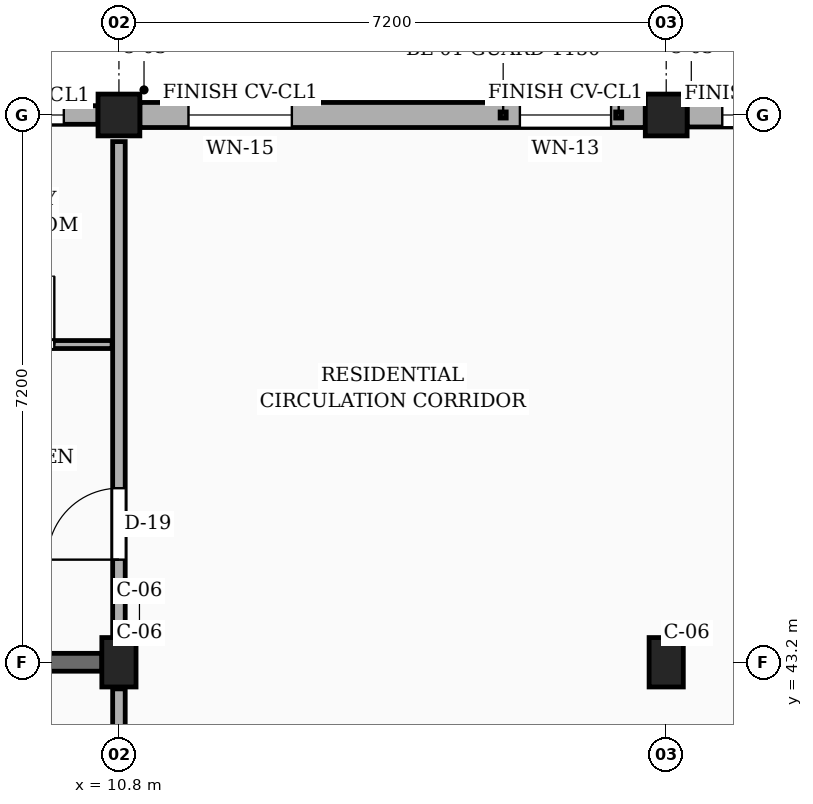
"""IFC4 building model, lengths in metres.
Left out: names, types, materials, properties, quantities, classifications, styles, units other than length and angle.
Written with IfcOpenShell. Run it as: python <this file> out.ifc"""

import sys

from ifc_helpers import new_model, si_unit, direction, frame, frame_2d, origin, origin_2d, place, context, subcontext, project, spatial, rectangle, extrude, element, fill, save


model = new_model("IFC4")
c1 = context("Model", 3, precision=1e-05, world=origin(), true_north=direction((0.0, 1.0)))
c2 = subcontext(c1, "Body", "Model", "MODEL_VIEW")
j1 = project(units=[si_unit("LENGTHUNIT", "METRE"), si_unit("PLANEANGLEUNIT", "RADIAN")], contexts=[c1])
p1 = place(None, origin())
s1 = spatial("IfcSite", under=j1, at=p1, CompositionType="ELEMENT")
p2 = place(p1, origin())
s2 = spatial("IfcBuilding", under=s1, at=p2, CompositionType="ELEMENT")
p3 = place(p2, frame((0.0, 0.0, 20.25)))
s3 = spatial("IfcBuildingStorey", under=s2, at=p3, CompositionType="ELEMENT", Elevation=20.25)
p4 = place(p3, frame((10.8, 43.2, 0.0), z_axis=(0.0, 0.0, 1.0), x_axis=(1.0, 0.0, 0.0)))
e1 = element("IfcColumn", 1, at=p4, inside=s3, PredefinedType="COLUMN", context=c2, shape_type="SweptSolid", body=[
    extrude(rectangle(XDim=0.45, YDim=0.65, at=origin_2d()), origin(), (0.0, 0.0, 1.0), 3.15),
])
p5 = place(p3, frame((10.8, 50.4, 0.0), z_axis=(0.0, 0.0, 1.0), x_axis=(1.0, 0.0, 0.0)))
e2 = element("IfcColumn", 2, at=p5, inside=s3, PredefinedType="COLUMN", context=c2, shape_type="SweptSolid", body=[
    extrude(rectangle(XDim=0.55, YDim=0.55, at=origin_2d()), origin(), (0.0, 0.0, 1.0), 3.15),
])
p6 = place(p3, frame((18.0, 43.2, 0.0), z_axis=(0.0, 0.0, 1.0), x_axis=(1.0, 0.0, 0.0)))
e3 = element("IfcColumn", 3, at=p6, inside=s3, PredefinedType="COLUMN", context=c2, shape_type="SweptSolid", body=[
    extrude(rectangle(XDim=0.45, YDim=0.65, at=origin_2d()), origin(), (0.0, 0.0, 1.0), 3.15),
])
p7 = place(p3, frame((18.0, 50.4, 0.0), z_axis=(0.0, 0.0, 1.0), x_axis=(1.0, 0.0, 0.0)))
e4 = element("IfcColumn", 4, at=p7, inside=s3, PredefinedType="COLUMN", context=c2, shape_type="SweptSolid", body=[
    extrude(rectangle(XDim=0.55, YDim=0.55, at=origin_2d()), origin(), (0.0, 0.0, 1.0), 3.15),
])
p8 = place(p3, frame((3.875, 43.2, 0.0), z_axis=(0.0, 0.0, 1.0), x_axis=(1.0, 0.0, 0.0)))
e5 = element("IfcWall", 5, at=p8, inside=s3, PredefinedType="SOLIDWALL", context=c2, shape_type="SweptSolid", body=[
    extrude(rectangle(XDim=6.7, YDim=0.235, at=frame_2d((3.35, 0.0))), origin(), (0.0, 0.0, 1.0), 2.17),
])
p9 = place(p3, frame((24.925, 50.4, 0.0), z_axis=(0.0, 0.0, 1.0), x_axis=(-1.0, 0.0, 0.0)))
e6 = element("IfcWall", 6, at=p9, inside=s3, PredefinedType="SOLIDWALL", context=c2, shape_type="SweptSolid", body=[
    extrude(rectangle(XDim=6.65, YDim=0.315, at=frame_2d((3.325, 0.0))), origin(), (0.0, 0.0, 1.0), 2.44),
])
p10 = place(p9, frame((2.155, 0.0, 0.78)))
e7 = element("IfcOpeningElement", 7, at=p10, cuts=e6, PredefinedType="OPENING", context=c2, shape_type="SweptSolid", body=[
    extrude(rectangle(XDim=1.04, YDim=1.26, at=frame_2d((0.52, 0.63))), frame((0.0, 0.167, 0.0), z_axis=(0.0, -1.0, 0.0), x_axis=(1.0, 0.0, 0.0)), (0.0, 0.0, 1.0), 0.335),
])
p11 = place(p9, frame((5.147, 0.0, 0.78)))
e8 = element("IfcOpeningElement", 8, at=p11, cuts=e6, PredefinedType="OPENING", context=c2, shape_type="SweptSolid", body=[
    extrude(rectangle(XDim=1.04, YDim=1.26, at=frame_2d((0.52, 0.63))), frame((0.0, 0.167, 0.0), z_axis=(0.0, -1.0, 0.0), x_axis=(1.0, 0.0, 0.0)), (0.0, 0.0, 1.0), 0.335),
])
p12 = place(p3, frame((17.725, 50.4, 0.0), z_axis=(0.0, 0.0, 1.0), x_axis=(-1.0, 0.0, 0.0)))
e9 = element("IfcWall", 9, at=p12, inside=s3, PredefinedType="SOLIDWALL", context=c2, shape_type="SweptSolid", body=[
    extrude(rectangle(XDim=6.65, YDim=0.33, at=frame_2d((3.325, 0.0))), origin(), (0.0, 0.0, 1.0), 2.44),
])
p13 = place(p12, frame((0.45, 0.0, 0.78)))
e10 = element("IfcOpeningElement", 10, at=p13, cuts=e9, PredefinedType="OPENING", context=c2, shape_type="SweptSolid", body=[
    extrude(rectangle(XDim=1.2, YDim=1.26, at=frame_2d((0.6, 0.63))), frame((0.0, 0.175, 0.0), z_axis=(0.0, -1.0, 0.0), x_axis=(1.0, 0.0, 0.0)), (0.0, 0.0, 1.0), 0.35),
])
p14 = place(p12, frame((4.65, 0.0, 0.78)))
e11 = element("IfcOpeningElement", 11, at=p14, cuts=e9, PredefinedType="OPENING", context=c2, shape_type="SweptSolid", body=[
    extrude(rectangle(XDim=1.36, YDim=1.26, at=frame_2d((0.68, 0.63))), frame((0.0, 0.175, 0.0), z_axis=(0.0, -1.0, 0.0), x_axis=(1.0, 0.0, 0.0)), (0.0, 0.0, 1.0), 0.35),
])
p15 = place(p3, frame((10.525, 50.4, 0.0), z_axis=(0.0, 0.0, 1.0), x_axis=(-1.0, 0.0, 0.0)))
e12 = element("IfcWall", 12, at=p15, inside=s3, PredefinedType="SOLIDWALL", context=c2, shape_type="SweptSolid", body=[
    extrude(rectangle(XDim=6.65, YDim=0.245, at=frame_2d((3.325, 0.0))), origin(), (0.0, 0.0, 1.0), 2.44),
])
p16 = place(p15, frame((0.45, 0.0, 0.78)))
e13 = element("IfcOpeningElement", 13, at=p16, cuts=e12, PredefinedType="OPENING", context=c2, shape_type="SweptSolid", body=[
    extrude(rectangle(XDim=1.36, YDim=1.26, at=frame_2d((0.68, 0.63))), frame((0.0, 0.133, 0.0), z_axis=(0.0, -1.0, 0.0), x_axis=(1.0, 0.0, 0.0)), (0.0, 0.0, 1.0), 0.265),
])
p17 = place(p15, frame((4.65, 0.0, 0.78)))
e14 = element("IfcOpeningElement", 14, at=p17, cuts=e12, PredefinedType="OPENING", context=c2, shape_type="SweptSolid", body=[
    extrude(rectangle(XDim=0.9, YDim=1.36, at=frame_2d((0.45, 0.68))), frame((0.0, 0.133, 0.0), z_axis=(0.0, -1.0, 0.0), x_axis=(1.0, 0.0, 0.0)), (0.0, 0.0, 1.0), 0.265),
])
p18 = place(p3, frame((10.8, 36.35, 0.0), z_axis=(0.0, 0.0, 1.0), x_axis=(0.0, 1.0, 0.0)))
e15 = element("IfcWall", 15, at=p18, inside=s3, PredefinedType="PARTITIONING", context=c2, shape_type="SweptSolid", body=[
    extrude(rectangle(XDim=6.5, YDim=0.165, at=frame_2d((3.25, 0.0))), origin(), (0.0, 0.0, 1.0), 2.305),
])
p19 = place(p18, frame((1.0, 0.0, 0.0)))
e16 = element("IfcOpeningElement", 16, at=p19, cuts=e15, PredefinedType="OPENING", context=c2, shape_type="SweptSolid", body=[
    extrude(rectangle(XDim=1.0, YDim=2.15, at=frame_2d((0.5, 1.075))), frame((0.0, 0.093, 0.0), z_axis=(0.0, -1.0, 0.0), x_axis=(1.0, 0.0, 0.0)), (0.0, 0.0, 1.0), 0.185),
])
p20 = place(p3, frame((10.8, 43.55, 0.0), z_axis=(0.0, 0.0, 1.0), x_axis=(0.0, 1.0, 0.0)))
e17 = element("IfcWall", 17, at=p20, inside=s3, PredefinedType="PARTITIONING", context=c2, shape_type="SweptSolid", body=[
    extrude(rectangle(XDim=6.5, YDim=0.165, at=frame_2d((3.25, 0.0))), origin(), (0.0, 0.0, 1.0), 2.305),
])
p21 = place(p20, frame((1.0, 0.0, 0.0)))
e18 = element("IfcOpeningElement", 18, at=p21, cuts=e17, PredefinedType="OPENING", context=c2, shape_type="SweptSolid", body=[
    extrude(rectangle(XDim=0.94, YDim=2.12, at=frame_2d((0.47, 1.06))), frame((0.0, 0.093, 0.0), z_axis=(0.0, -1.0, 0.0), x_axis=(1.0, 0.0, 0.0)), (0.0, 0.0, 1.0), 0.185),
])
p22 = place(p3, frame((8.29, 47.38, 0.0), z_axis=(0.0, 0.0, 1.0), x_axis=(1.0, 0.0, 0.0)))
e19 = element("IfcWall", 19, at=p22, inside=s3, PredefinedType="PARTITIONING", context=c2, shape_type="SweptSolid", body=[
    extrude(rectangle(XDim=2.42, YDim=0.105, at=frame_2d((1.21, 0.0))), origin(), (0.0, 0.0, 1.0), 2.305),
])
p23 = place(p22, frame((0.76, 0.0, 0.0)))
e20 = element("IfcOpeningElement", 20, at=p23, cuts=e19, PredefinedType="OPENING", context=c2, shape_type="SweptSolid", body=[
    extrude(rectangle(XDim=0.9, YDim=2.05, at=frame_2d((0.45, 1.025))), frame((0.0, 0.062, 0.0), z_axis=(0.0, -1.0, 0.0), x_axis=(1.0, 0.0, 0.0)), (0.0, 0.0, 1.0), 0.125),
])
p24 = place(p11, origin())
e21 = element("IfcWindow", 21, at=p24, inside=s3, PartitioningType="SINGLE_PANEL", PredefinedType="WINDOW", context=c2, shape_type="SweptSolid", body=[
    extrude(rectangle(XDim=1.04, YDim=1.26, at=frame_2d((0.52, 0.63))), frame((0.0, 0.03, 0.0), z_axis=(0.0, -1.0, 0.0), x_axis=(1.0, 0.0, 0.0)), (0.0, 0.0, 1.0), 0.06),
])
fill(e8, e21)
p25 = place(p13, origin())
e22 = element("IfcWindow", 22, at=p25, inside=s3, PartitioningType="SINGLE_PANEL", PredefinedType="WINDOW", context=c2, shape_type="SweptSolid", body=[
    extrude(rectangle(XDim=1.2, YDim=1.26, at=frame_2d((0.6, 0.63))), frame((0.0, 0.03, 0.0), z_axis=(0.0, -1.0, 0.0), x_axis=(1.0, 0.0, 0.0)), (0.0, 0.0, 1.0), 0.06),
])
fill(e10, e22)
p26 = place(p14, origin())
e23 = element("IfcWindow", 23, at=p26, inside=s3, PartitioningType="SINGLE_PANEL", PredefinedType="WINDOW", context=c2, shape_type="SweptSolid", body=[
    extrude(rectangle(XDim=1.36, YDim=1.26, at=frame_2d((0.68, 0.63))), frame((0.0, 0.03, 0.0), z_axis=(0.0, -1.0, 0.0), x_axis=(1.0, 0.0, 0.0)), (0.0, 0.0, 1.0), 0.06),
])
fill(e11, e23)
p27 = place(p16, origin())
e24 = element("IfcWindow", 24, at=p27, inside=s3, PartitioningType="SINGLE_PANEL", PredefinedType="WINDOW", context=c2, shape_type="SweptSolid", body=[
    extrude(rectangle(XDim=1.36, YDim=1.26, at=frame_2d((0.68, 0.63))), frame((0.0, 0.03, 0.0), z_axis=(0.0, -1.0, 0.0), x_axis=(1.0, 0.0, 0.0)), (0.0, 0.0, 1.0), 0.06),
])
fill(e13, e24)
p28 = place(p21, origin())
e25 = element("IfcDoor", 25, at=p28, inside=s3, OperationType="SINGLE_SWING_LEFT", PredefinedType="DOOR", context=c2, shape_type="SweptSolid", body=[
    extrude(rectangle(XDim=0.94, YDim=2.12, at=frame_2d((0.47, 1.06))), frame((0.0, 0.025, 0.0), z_axis=(0.0, -1.0, 0.0), x_axis=(1.0, 0.0, 0.0)), (0.0, 0.0, 1.0), 0.05),
])
fill(e18, e25)
p29 = place(p23, origin())
e26 = element("IfcDoor", 26, at=p29, inside=s3, OperationType="SINGLE_SWING_RIGHT", PredefinedType="DOOR", context=c2, shape_type="SweptSolid", body=[
    extrude(rectangle(XDim=0.9, YDim=2.05, at=frame_2d((0.45, 1.025))), frame((0.0, 0.025, 0.0), z_axis=(0.0, -1.0, 0.0), x_axis=(1.0, 0.0, 0.0)), (0.0, 0.0, 1.0), 0.05),
])
fill(e20, e26)
save(model, sys.argv[1])
